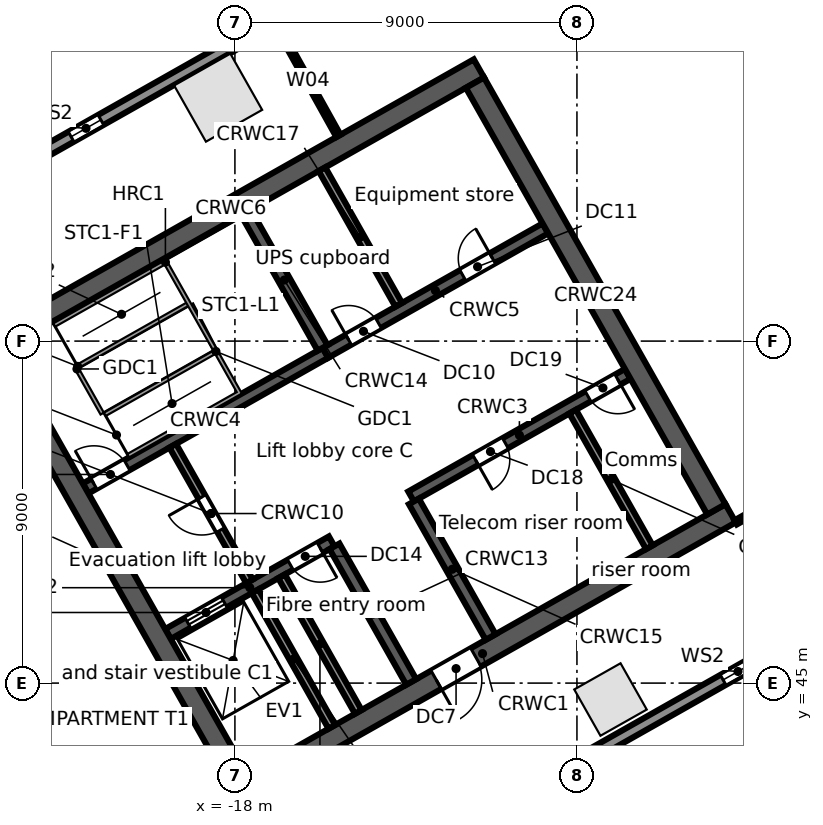
"""IFC4 building model, lengths in metres.
Left out: names, types, materials, properties, quantities, classifications, styles, units other than length and angle.
Written with IfcOpenShell. Run it as: python <this file> out.ifc"""

import sys

from ifc_helpers import new_model, si_unit, direction, frame, frame_2d, origin, origin_2d, place, context, subcontext, project, spatial, rectangle, extrude, element, fill, save


model = new_model("IFC4")
c1 = context("Model", 3, precision=1e-05, world=origin(), true_north=direction((0.0, 1.0)))
c2 = subcontext(c1, "Body", "Model", "MODEL_VIEW")
j1 = project(units=[si_unit("LENGTHUNIT", "METRE"), si_unit("PLANEANGLEUNIT", "RADIAN")], contexts=[c1])
p1 = place(None, origin())
s1 = spatial("IfcSite", under=j1, at=p1, CompositionType="ELEMENT")
p2 = place(p1, origin())
s2 = spatial("IfcBuilding", under=s1, at=p2, CompositionType="ELEMENT")
p3 = place(p2, frame((0.0, 0.0, 123.5)))
s3 = spatial("IfcBuildingStorey", under=s2, at=p3, CompositionType="ELEMENT", Elevation=123.5)
p4 = place(p3, frame((-18.441, 60.406, 0.0), z_axis=(0.0, 0.0, 1.0), x_axis=(-0.87035569594, -0.492423560103, 0.0)))
e1 = element("IfcColumn", 1, at=p4, inside=s3, PredefinedType="COLUMN", context=c2, shape_type="SweptSolid", body=[
    extrude(rectangle(XDim=1.7, YDim=1.7, at=origin_2d()), origin(), (0.0, 0.0, 1.0), 4.4),
])
p5 = place(p3, frame((-8.117, 44.568, 0.0), z_axis=(0.0, 0.0, 1.0), x_axis=(0.87035569594, 0.492423560103, 0.0)))
e2 = element("IfcColumn", 2, at=p5, inside=s3, PredefinedType="COLUMN", context=c2, shape_type="SweptSolid", body=[
    extrude(rectangle(XDim=1.4, YDim=1.4, at=origin_2d()), origin(), (0.0, 0.0, 1.0), 4.4),
])
p6 = place(p3, frame((-58.745, 38.764, 0.0), z_axis=(0.0, 0.0, 1.0), x_axis=(0.870355811726, 0.492423355453, 0.0)))
e3 = element("IfcWall", 3, at=p6, inside=s3, PredefinedType="STANDARD", context=c2, shape_type="SweptSolid", body=[
    extrude(rectangle(XDim=64.025, YDim=0.3, at=frame_2d((32.013, 0.0))), origin(), (0.0, 0.0, 1.0), 4.08),
])
p7 = place(p6, frame((60.122, 0.0, 0.6)))
e4 = element("IfcOpeningElement", 4, at=p7, cuts=e3, PredefinedType="OPENING", context=c2, shape_type="SweptSolid", body=[
    extrude(rectangle(XDim=0.9, YDim=2.8, at=frame_2d((0.45, 1.4))), frame((0.0, 0.16, 0.0), z_axis=(0.0, -1.0, 0.0), x_axis=(1.0, 0.0, 0.0)), (0.0, 0.0, 1.0), 0.32),
])
p8 = place(p6, frame((50.992, 0.0, 0.6)))
e5 = element("IfcOpeningElement", 5, at=p8, cuts=e3, PredefinedType="OPENING", context=c2, shape_type="SweptSolid", body=[
    extrude(rectangle(XDim=0.9, YDim=2.8, at=frame_2d((0.45, 1.4))), frame((0.0, 0.16, 0.0), z_axis=(0.0, -1.0, 0.0), x_axis=(1.0, 0.0, 0.0)), (0.0, 0.0, 1.0), 0.32),
])
p9 = place(p6, frame((41.862, 0.0, 0.6)))
e6 = element("IfcOpeningElement", 6, at=p9, cuts=e3, PredefinedType="OPENING", context=c2, shape_type="SweptSolid", body=[
    extrude(rectangle(XDim=0.9, YDim=2.8, at=frame_2d((0.45, 1.4))), frame((0.0, 0.16, 0.0), z_axis=(0.0, -1.0, 0.0), x_axis=(1.0, 0.0, 0.0)), (0.0, 0.0, 1.0), 0.32),
])
p10 = place(p6, frame((32.732, 0.0, 0.6)))
e7 = element("IfcOpeningElement", 7, at=p10, cuts=e3, PredefinedType="OPENING", context=c2, shape_type="SweptSolid", body=[
    extrude(rectangle(XDim=0.9, YDim=2.8, at=frame_2d((0.45, 1.4))), frame((0.0, 0.16, 0.0), z_axis=(0.0, -1.0, 0.0), x_axis=(1.0, 0.0, 0.0)), (0.0, 0.0, 1.0), 0.32),
])
p11 = place(p6, frame((23.602, 0.0, 0.6)))
e8 = element("IfcOpeningElement", 8, at=p11, cuts=e3, PredefinedType="OPENING", context=c2, shape_type="SweptSolid", body=[
    extrude(rectangle(XDim=0.9, YDim=2.8, at=frame_2d((0.45, 1.4))), frame((0.0, 0.16, 0.0), z_axis=(0.0, -1.0, 0.0), x_axis=(1.0, 0.0, 0.0)), (0.0, 0.0, 1.0), 0.32),
])
p12 = place(p6, frame((14.472, 0.0, 0.6)))
e9 = element("IfcOpeningElement", 9, at=p12, cuts=e3, PredefinedType="OPENING", context=c2, shape_type="SweptSolid", body=[
    extrude(rectangle(XDim=0.9, YDim=2.8, at=frame_2d((0.45, 1.4))), frame((0.0, 0.16, 0.0), z_axis=(0.0, -1.0, 0.0), x_axis=(1.0, 0.0, 0.0)), (0.0, 0.0, 1.0), 0.32),
])
p13 = place(p6, frame((5.342, 0.0, 0.6)))
e10 = element("IfcOpeningElement", 10, at=p13, cuts=e3, PredefinedType="OPENING", context=c2, shape_type="SweptSolid", body=[
    extrude(rectangle(XDim=0.9, YDim=2.8, at=frame_2d((0.45, 1.4))), frame((0.0, 0.16, 0.0), z_axis=(0.0, -1.0, 0.0), x_axis=(1.0, 0.0, 0.0)), (0.0, 0.0, 1.0), 0.32),
])
p14 = place(p3, frame((-0.055, 47.969, 0.0), z_axis=(0.0, 0.0, 1.0), x_axis=(-0.870355730478, -0.492423499058, 0.0)))
e11 = element("IfcWall", 11, at=p14, inside=s3, PredefinedType="STANDARD", context=c2, shape_type="SweptSolid", body=[
    extrude(rectangle(XDim=43.75, YDim=0.3, at=frame_2d((21.875, 0.0))), origin(), (0.0, 0.0, 1.0), 4.08),
])
p15 = place(p14, frame((39.977, 0.0, 0.6)))
e12 = element("IfcOpeningElement", 12, at=p15, cuts=e11, PredefinedType="OPENING", context=c2, shape_type="SweptSolid", body=[
    extrude(rectangle(XDim=0.9, YDim=2.8, at=frame_2d((0.45, 1.4))), frame((0.0, 0.16, 0.0), z_axis=(0.0, -1.0, 0.0), x_axis=(1.0, 0.0, 0.0)), (0.0, 0.0, 1.0), 0.32),
])
p16 = place(p14, frame((31.222, 0.0, 0.6)))
e13 = element("IfcOpeningElement", 13, at=p16, cuts=e11, PredefinedType="OPENING", context=c2, shape_type="SweptSolid", body=[
    extrude(rectangle(XDim=0.9, YDim=2.8, at=frame_2d((0.45, 1.4))), frame((0.0, 0.16, 0.0), z_axis=(0.0, -1.0, 0.0), x_axis=(1.0, 0.0, 0.0)), (0.0, 0.0, 1.0), 0.32),
])
p17 = place(p14, frame((22.468, 0.0, 0.6)))
e14 = element("IfcOpeningElement", 14, at=p17, cuts=e11, PredefinedType="OPENING", context=c2, shape_type="SweptSolid", body=[
    extrude(rectangle(XDim=0.9, YDim=2.8, at=frame_2d((0.45, 1.4))), frame((0.0, 0.16, 0.0), z_axis=(0.0, -1.0, 0.0), x_axis=(1.0, 0.0, 0.0)), (0.0, 0.0, 1.0), 0.32),
])
p18 = place(p14, frame((13.713, 0.0, 0.6)))
e15 = element("IfcOpeningElement", 15, at=p18, cuts=e11, PredefinedType="OPENING", context=c2, shape_type="SweptSolid", body=[
    extrude(rectangle(XDim=0.9, YDim=2.8, at=frame_2d((0.45, 1.4))), frame((0.0, 0.16, 0.0), z_axis=(0.0, -1.0, 0.0), x_axis=(1.0, 0.0, 0.0)), (0.0, 0.0, 1.0), 0.32),
])
p19 = place(p14, frame((4.959, 0.0, 0.6)))
e16 = element("IfcOpeningElement", 16, at=p19, cuts=e11, PredefinedType="OPENING", context=c2, shape_type="SweptSolid", body=[
    extrude(rectangle(XDim=0.9, YDim=2.8, at=frame_2d((0.45, 1.4))), frame((0.0, 0.16, 0.0), z_axis=(0.0, -1.0, 0.0), x_axis=(1.0, 0.0, 0.0)), (0.0, 0.0, 1.0), 0.32),
])
p20 = place(p3, frame((-18.012, 42.083, 0.0), z_axis=(0.0, 0.0, 1.0), x_axis=(0.870360574057, 0.492414937962, 0.0)))
e17 = element("IfcWall", 17, at=p20, inside=s3, PredefinedType="SOLIDWALL", context=c2, shape_type="SweptSolid", body=[
    extrude(rectangle(XDim=15.0, YDim=0.55, at=frame_2d((7.5, 0.0))), origin(), (0.0, 0.0, 1.0), 4.08),
])
p21 = place(p20, frame((6.1, 0.0, 0.0)))
e18 = element("IfcOpeningElement", 18, at=p21, cuts=e17, PredefinedType="OPENING", context=c2, shape_type="SweptSolid", body=[
    extrude(rectangle(XDim=1.2, YDim=2.1, at=frame_2d((0.6, 1.05))), frame((0.0, 0.285, 0.0), z_axis=(0.0, -1.0, 0.0), x_axis=(1.0, 0.0, 0.0)), (0.0, 0.0, 1.0), 0.57),
])
p22 = place(p3, frame((-19.762, 46.292, 0.0), z_axis=(0.0, 0.0, 1.0), x_axis=(0.870359758983, 0.49241637863, 0.0)))
e19 = element("IfcWall", 19, at=p22, inside=s3, PredefinedType="SOLIDWALL", context=c2, shape_type="SweptSolid", body=[
    extrude(rectangle(XDim=4.95, YDim=0.3, at=frame_2d((2.475, 0.0))), origin(), (0.0, 0.0, 1.0), 4.08),
])
p23 = place(p22, frame((0.6, 0.0, 0.0)))
e20 = element("IfcOpeningElement", 20, at=p23, cuts=e19, PredefinedType="OPENING", context=c2, shape_type="SweptSolid", body=[
    extrude(rectangle(XDim=1.1, YDim=2.1, at=frame_2d((0.55, 1.05))), frame((0.0, 0.16, 0.0), z_axis=(0.0, -1.0, 0.0), x_axis=(1.0, 0.0, 0.0)), (0.0, 0.0, 1.0), 0.32),
])
p24 = place(p22, frame((3.7, 0.0, 0.0)))
e21 = element("IfcOpeningElement", 21, at=p24, cuts=e19, PredefinedType="OPENING", context=c2, shape_type="SweptSolid", body=[
    extrude(rectangle(XDim=0.9, YDim=2.1, at=frame_2d((0.45, 1.05))), frame((0.0, 0.16, 0.0), z_axis=(0.0, -1.0, 0.0), x_axis=(1.0, 0.0, 0.0)), (0.0, 0.0, 1.0), 0.32),
])
p25 = place(p3, frame((-13.365, 49.911, 0.0), z_axis=(0.0, 0.0, 1.0), x_axis=(0.870336435567, 0.492457601144, 0.0)))
e22 = element("IfcWall", 22, at=p25, inside=s3, PredefinedType="SOLIDWALL", context=c2, shape_type="SweptSolid", body=[
    extrude(rectangle(XDim=6.55, YDim=0.3, at=frame_2d((3.275, 0.0))), origin(), (0.0, 0.0, 1.0), 4.08),
])
p26 = place(p25, frame((1.95, 0.0, 0.0)))
e23 = element("IfcOpeningElement", 23, at=p26, cuts=e22, PredefinedType="OPENING", context=c2, shape_type="SweptSolid", body=[
    extrude(rectangle(XDim=0.9, YDim=2.1, at=frame_2d((0.45, 1.05))), frame((0.0, 0.16, 0.0), z_axis=(0.0, -1.0, 0.0), x_axis=(1.0, 0.0, 0.0)), (0.0, 0.0, 1.0), 0.32),
])
p27 = place(p25, frame((5.35, 0.0, 0.0)))
e24 = element("IfcOpeningElement", 24, at=p27, cuts=e22, PredefinedType="OPENING", context=c2, shape_type="SweptSolid", body=[
    extrude(rectangle(XDim=0.9, YDim=2.1, at=frame_2d((0.45, 1.05))), frame((0.0, 0.16, 0.0), z_axis=(0.0, -1.0, 0.0), x_axis=(1.0, 0.0, 0.0)), (0.0, 0.0, 1.0), 0.32),
])
p28 = place(p3, frame((-21.928, 50.121, 0.0), z_axis=(0.0, 0.0, 1.0), x_axis=(0.870340732628, 0.49245000673, 0.0)))
e25 = element("IfcWall", 25, at=p28, inside=s3, PredefinedType="SOLIDWALL", context=c2, shape_type="SweptSolid", body=[
    extrude(rectangle(XDim=7.25, YDim=0.3, at=frame_2d((3.625, 0.0))), origin(), (0.0, 0.0, 1.0), 4.08),
])
p29 = place(p28, frame((0.25, 0.0, 0.0)))
e26 = element("IfcOpeningElement", 26, at=p29, cuts=e25, PredefinedType="OPENING", context=c2, shape_type="SweptSolid", body=[
    extrude(rectangle(XDim=1.0, YDim=2.1, at=frame_2d((0.5, 1.05))), frame((0.0, 0.16, 0.0), z_axis=(0.0, -1.0, 0.0), x_axis=(1.0, 0.0, 0.0)), (0.0, 0.0, 1.0), 0.32),
])
p30 = place(p3, frame((-15.618, 53.691, 0.0), z_axis=(0.0, 0.0, 1.0), x_axis=(0.870367894134, 0.492401999246, 0.0)))
e27 = element("IfcWall", 27, at=p30, inside=s3, PredefinedType="SOLIDWALL", context=c2, shape_type="SweptSolid", body=[
    extrude(rectangle(XDim=6.65, YDim=0.3, at=frame_2d((3.325, 0.0))), origin(), (0.0, 0.0, 1.0), 4.08),
])
p31 = place(p30, frame((0.7, 0.0, 0.0)))
e28 = element("IfcOpeningElement", 28, at=p31, cuts=e27, PredefinedType="OPENING", context=c2, shape_type="SweptSolid", body=[
    extrude(rectangle(XDim=0.9, YDim=2.1, at=frame_2d((0.45, 1.05))), frame((0.0, 0.16, 0.0), z_axis=(0.0, -1.0, 0.0), x_axis=(1.0, 0.0, 0.0)), (0.0, 0.0, 1.0), 0.32),
])
p32 = place(p30, frame((4.15, 0.0, 0.0)))
e29 = element("IfcOpeningElement", 29, at=p32, cuts=e27, PredefinedType="OPENING", context=c2, shape_type="SweptSolid", body=[
    extrude(rectangle(XDim=0.9, YDim=2.1, at=frame_2d((0.45, 1.05))), frame((0.0, 0.16, 0.0), z_axis=(0.0, -1.0, 0.0), x_axis=(1.0, 0.0, 0.0)), (0.0, 0.0, 1.0), 0.32),
])
p33 = place(p3, frame((-24.635, 53.789, 0.0), z_axis=(0.0, 0.0, 1.0), x_axis=(0.870360574057, 0.492414937962, 0.0)))
e30 = element("IfcWall", 30, at=p33, inside=s3, PredefinedType="SOLIDWALL", context=c2, shape_type="SweptSolid", body=[
    extrude(rectangle(XDim=15.0, YDim=0.55, at=frame_2d((7.5, 0.0))), origin(), (0.0, 0.0, 1.0), 4.08),
])
p34 = place(p3, frame((-24.26, 53.685, 0.0), z_axis=(0.0, 0.0, 1.0), x_axis=(0.492427022044, -0.870353737259, 0.0)))
e31 = element("IfcWall", 31, at=p34, inside=s3, PredefinedType="SOLIDWALL", context=c2, shape_type="SweptSolid", body=[
    extrude(rectangle(XDim=12.9, YDim=0.55, at=frame_2d((6.45, 0.0))), origin(), (0.0, 0.0, 1.0), 4.08),
])
p35 = place(p3, frame((-17.469, 47.417, 0.0), z_axis=(0.0, 0.0, 1.0), x_axis=(0.492453559952, -0.87033872216, 0.0)))
e32 = element("IfcWall", 32, at=p35, inside=s3, PredefinedType="SOLIDWALL", context=c2, shape_type="SweptSolid", body=[
    extrude(rectangle(XDim=4.1, YDim=0.2, at=frame_2d((2.05, 0.0))), origin(), (0.0, 0.0, 1.0), 4.08),
])
p36 = place(p3, frame((-19.635, 51.246, 0.0), z_axis=(0.0, 0.0, 1.0), x_axis=(0.492408451753, -0.87036424366, 0.0)))
e33 = element("IfcWall", 33, at=p36, inside=s3, PredefinedType="PARTITIONING", context=c2, shape_type="SweptSolid", body=[
    extrude(rectangle(XDim=4.1, YDim=0.2, at=frame_2d((2.05, 0.0))), origin(), (0.0, 0.0, 1.0), 4.08),
])
p37 = place(p36, frame((1.55, 0.0, 0.0)))
e34 = element("IfcOpeningElement", 34, at=p37, cuts=e33, PredefinedType="OPENING", context=c2, shape_type="SweptSolid", body=[
    extrude(rectangle(XDim=1.0, YDim=2.1, at=frame_2d((0.5, 1.05))), frame((0.0, 0.11, 0.0), z_axis=(0.0, -1.0, 0.0), x_axis=(1.0, 0.0, 0.0)), (0.0, 0.0, 1.0), 0.22),
])
p38 = place(p3, frame((-16.772, 47.811, 0.0), z_axis=(0.0, 0.0, 1.0), x_axis=(0.492428039142, -0.870353161807, 0.0)))
e35 = element("IfcWall", 35, at=p38, inside=s3, PredefinedType="SOLIDWALL", context=c2, shape_type="SweptSolid", body=[
    extrude(rectangle(XDim=4.1, YDim=0.2, at=frame_2d((2.05, 0.0))), origin(), (0.0, 0.0, 1.0), 4.08),
])
for number, where, z_axis, x_axis in (
    (36, (-15.379, 48.599, 0.0), (0.0, 0.0, 1.0), (0.492, -0.87, 0.0)),
    (37, (-17.711, 57.39, 0.0), (0.0, 0.0, 1.0), (0.492, -0.87, 0.0)),
):
    element("IfcWall", number, at=place(p3, frame(where, z_axis=z_axis, x_axis=x_axis)), inside=s3, PredefinedType="SOLIDWALL", context=c2, shape_type="SweptSolid", body=[
        extrude(rectangle(XDim=4.1, YDim=0.3, at=frame_2d((2.05, 0.0))), origin(), (0.0, 0.0, 1.0), 4.08),
    ])
p39 = place(p3, frame((-13.291, 49.781, 0.0), z_axis=(0.0, 0.0, 1.0), x_axis=(0.492382931784, -0.870378681085, 0.0)))
e38 = element("IfcWall", 38, at=p39, inside=s3, PredefinedType="SOLIDWALL", context=c2, shape_type="SweptSolid", body=[
    extrude(rectangle(XDim=4.1, YDim=0.3, at=frame_2d((2.05, 0.0))), origin(), (0.0, 0.0, 1.0), 4.08),
])
p40 = place(p3, frame((-15.709, 58.523, 0.0), z_axis=(0.0, 0.0, 1.0), x_axis=(0.492428039142, -0.870353161807, 0.0)))
e39 = element("IfcWall", 39, at=p40, inside=s3, PredefinedType="PARTITIONING", context=c2, shape_type="SweptSolid", body=[
    extrude(rectangle(XDim=4.1, YDim=0.2, at=frame_2d((2.05, 0.0))), origin(), (0.0, 0.0, 1.0), 4.08),
])
p41 = place(p3, frame((-9.113, 52.144, 0.0), z_axis=(0.0, 0.0, 1.0), x_axis=(0.492408451753, -0.87036424366, 0.0)))
e40 = element("IfcWall", 40, at=p41, inside=s3, PredefinedType="PARTITIONING", context=c2, shape_type="SweptSolid", body=[
    extrude(rectangle(XDim=4.1, YDim=0.2, at=frame_2d((2.05, 0.0))), origin(), (0.0, 0.0, 1.0), 4.08),
])
p42 = place(p3, frame((-11.684, 60.8, 0.0), z_axis=(0.0, 0.0, 1.0), x_axis=(0.492427022044, -0.870353737259, 0.0)))
e41 = element("IfcWall", 41, at=p42, inside=s3, PredefinedType="SOLIDWALL", context=c2, shape_type="SweptSolid", body=[
    extrude(rectangle(XDim=12.9, YDim=0.55, at=frame_2d((6.45, 0.0))), origin(), (0.0, 0.0, 1.0), 4.08),
])
p43 = place(p3, frame((-16.879, 62.278, 0.0), z_axis=(0.0, 0.0, 1.0), x_axis=(0.486580163018, -0.873635933875, 0.0)))
e42 = element("IfcWall", 42, at=p43, inside=s3, PredefinedType="PARTITIONING", context=c2, shape_type="SweptSolid", body=[
    extrude(rectangle(XDim=3.294, YDim=0.125, at=frame_2d((1.647, 0.0))), origin(), (0.0, 0.0, 1.0), 3.36),
])
p44 = place(p3, frame((-4.821, 49.23, 0.0), z_axis=(0.0, 0.0, 1.0), x_axis=(0.870371217631, 0.492396124598, 0.0)))
e43 = element("IfcWall", 43, at=p44, inside=s3, PredefinedType="PARTITIONING", context=c2, shape_type="SweptSolid", body=[
    extrude(rectangle(XDim=2.659, YDim=0.125, at=frame_2d((1.329, 0.0))), origin(), (0.0, 0.0, 1.0), 4.08),
])
p45 = place(p9, origin())
e44 = element("IfcWindow", 44, at=p45, inside=s3, PartitioningType="SINGLE_PANEL", PredefinedType="WINDOW", context=c2, shape_type="SweptSolid", body=[
    extrude(rectangle(XDim=0.9, YDim=2.8, at=frame_2d((0.45, 1.4))), frame((0.0, 0.03, 0.0), z_axis=(0.0, -1.0, 0.0), x_axis=(1.0, 0.0, 0.0)), (0.0, 0.0, 1.0), 0.06),
])
fill(e6, e44)
p46 = place(p19, origin())
e45 = element("IfcWindow", 45, at=p46, inside=s3, PartitioningType="SINGLE_PANEL", PredefinedType="WINDOW", context=c2, shape_type="SweptSolid", body=[
    extrude(rectangle(XDim=0.9, YDim=2.8, at=frame_2d((0.45, 1.4))), frame((0.0, 0.03, 0.0), z_axis=(0.0, -1.0, 0.0), x_axis=(1.0, 0.0, 0.0)), (0.0, 0.0, 1.0), 0.06),
])
fill(e16, e45)
p47 = place(p23, origin())
e46 = element("IfcDoor", 46, at=p47, inside=s3, OperationType="DOUBLE_DOOR_SLIDING", PredefinedType="DOOR", context=c2, shape_type="SweptSolid", body=[
    extrude(rectangle(XDim=1.1, YDim=2.1, at=frame_2d((0.55, 1.05))), frame((0.0, 0.025, 0.0), z_axis=(0.0, -1.0, 0.0), x_axis=(1.0, 0.0, 0.0)), (0.0, 0.0, 1.0), 0.05),
])
fill(e20, e46)
p48 = place(p29, origin())
e47 = element("IfcDoor", 47, at=p48, inside=s3, OperationType="SINGLE_SWING_LEFT", PredefinedType="DOOR", context=c2, shape_type="SweptSolid", body=[
    extrude(rectangle(XDim=1.0, YDim=2.1, at=frame_2d((0.5, 1.05))), frame((0.0, 0.025, 0.0), z_axis=(0.0, -1.0, 0.0), x_axis=(1.0, 0.0, 0.0)), (0.0, 0.0, 1.0), 0.05),
])
fill(e26, e47)
p49 = place(p37, frame((1.0, 0.0, 0.0), z_axis=(0.0, 0.0, 1.0), x_axis=(-1.0, 0.0, 0.0)))
e48 = element("IfcDoor", 48, at=p49, inside=s3, OperationType="SINGLE_SWING_RIGHT", PredefinedType="DOOR", context=c2, shape_type="SweptSolid", body=[
    extrude(rectangle(XDim=1.0, YDim=2.1, at=frame_2d((0.5, 1.05))), frame((0.0, 0.025, 0.0), z_axis=(0.0, -1.0, 0.0), x_axis=(1.0, 0.0, 0.0)), (0.0, 0.0, 1.0), 0.05),
])
fill(e34, e48)
p50 = place(p21, frame((1.2, 0.0, 0.0), z_axis=(0.0, 0.0, 1.0), x_axis=(-1.0, 0.0, 0.0)))
e49 = element("IfcDoor", 49, at=p50, inside=s3, OperationType="SINGLE_SWING_RIGHT", PredefinedType="DOOR", context=c2, shape_type="SweptSolid", body=[
    extrude(rectangle(XDim=1.2, YDim=2.1, at=frame_2d((0.6, 1.05))), frame((0.0, 0.025, 0.0), z_axis=(0.0, -1.0, 0.0), x_axis=(1.0, 0.0, 0.0)), (0.0, 0.0, 1.0), 0.05),
])
fill(e18, e49)
p51 = place(p31, origin())
e50 = element("IfcDoor", 50, at=p51, inside=s3, OperationType="SINGLE_SWING_LEFT", PredefinedType="DOOR", context=c2, shape_type="SweptSolid", body=[
    extrude(rectangle(XDim=0.9, YDim=2.1, at=frame_2d((0.45, 1.05))), frame((0.0, 0.025, 0.0), z_axis=(0.0, -1.0, 0.0), x_axis=(1.0, 0.0, 0.0)), (0.0, 0.0, 1.0), 0.05),
])
fill(e28, e50)
p52 = place(p32, origin())
e51 = element("IfcDoor", 51, at=p52, inside=s3, OperationType="SINGLE_SWING_RIGHT", PredefinedType="DOOR", context=c2, shape_type="SweptSolid", body=[
    extrude(rectangle(XDim=0.9, YDim=2.1, at=frame_2d((0.45, 1.05))), frame((0.0, 0.025, 0.0), z_axis=(0.0, -1.0, 0.0), x_axis=(1.0, 0.0, 0.0)), (0.0, 0.0, 1.0), 0.05),
])
fill(e29, e51)
p53 = place(p24, frame((0.9, 0.0, 0.0), z_axis=(0.0, 0.0, 1.0), x_axis=(-1.0, 0.0, 0.0)))
e52 = element("IfcDoor", 52, at=p53, inside=s3, OperationType="SINGLE_SWING_LEFT", PredefinedType="DOOR", context=c2, shape_type="SweptSolid", body=[
    extrude(rectangle(XDim=0.9, YDim=2.1, at=frame_2d((0.45, 1.05))), frame((0.0, 0.025, 0.0), z_axis=(0.0, -1.0, 0.0), x_axis=(1.0, 0.0, 0.0)), (0.0, 0.0, 1.0), 0.05),
])
fill(e21, e52)
p54 = place(p26, frame((0.9, 0.0, 0.0), z_axis=(0.0, 0.0, 1.0), x_axis=(-1.0, 0.0, 0.0)))
e53 = element("IfcDoor", 53, at=p54, inside=s3, OperationType="SINGLE_SWING_RIGHT", PredefinedType="DOOR", context=c2, shape_type="SweptSolid", body=[
    extrude(rectangle(XDim=0.9, YDim=2.1, at=frame_2d((0.45, 1.05))), frame((0.0, 0.025, 0.0), z_axis=(0.0, -1.0, 0.0), x_axis=(1.0, 0.0, 0.0)), (0.0, 0.0, 1.0), 0.05),
])
fill(e23, e53)
p55 = place(p27, frame((0.9, 0.0, 0.0), z_axis=(0.0, 0.0, 1.0), x_axis=(-1.0, 0.0, 0.0)))
e54 = element("IfcDoor", 54, at=p55, inside=s3, OperationType="SINGLE_SWING_LEFT", PredefinedType="DOOR", context=c2, shape_type="SweptSolid", body=[
    extrude(rectangle(XDim=0.9, YDim=2.1, at=frame_2d((0.45, 1.05))), frame((0.0, 0.025, 0.0), z_axis=(0.0, -1.0, 0.0), x_axis=(1.0, 0.0, 0.0)), (0.0, 0.0, 1.0), 0.05),
])
fill(e24, e54)
save(model, sys.argv[1])
